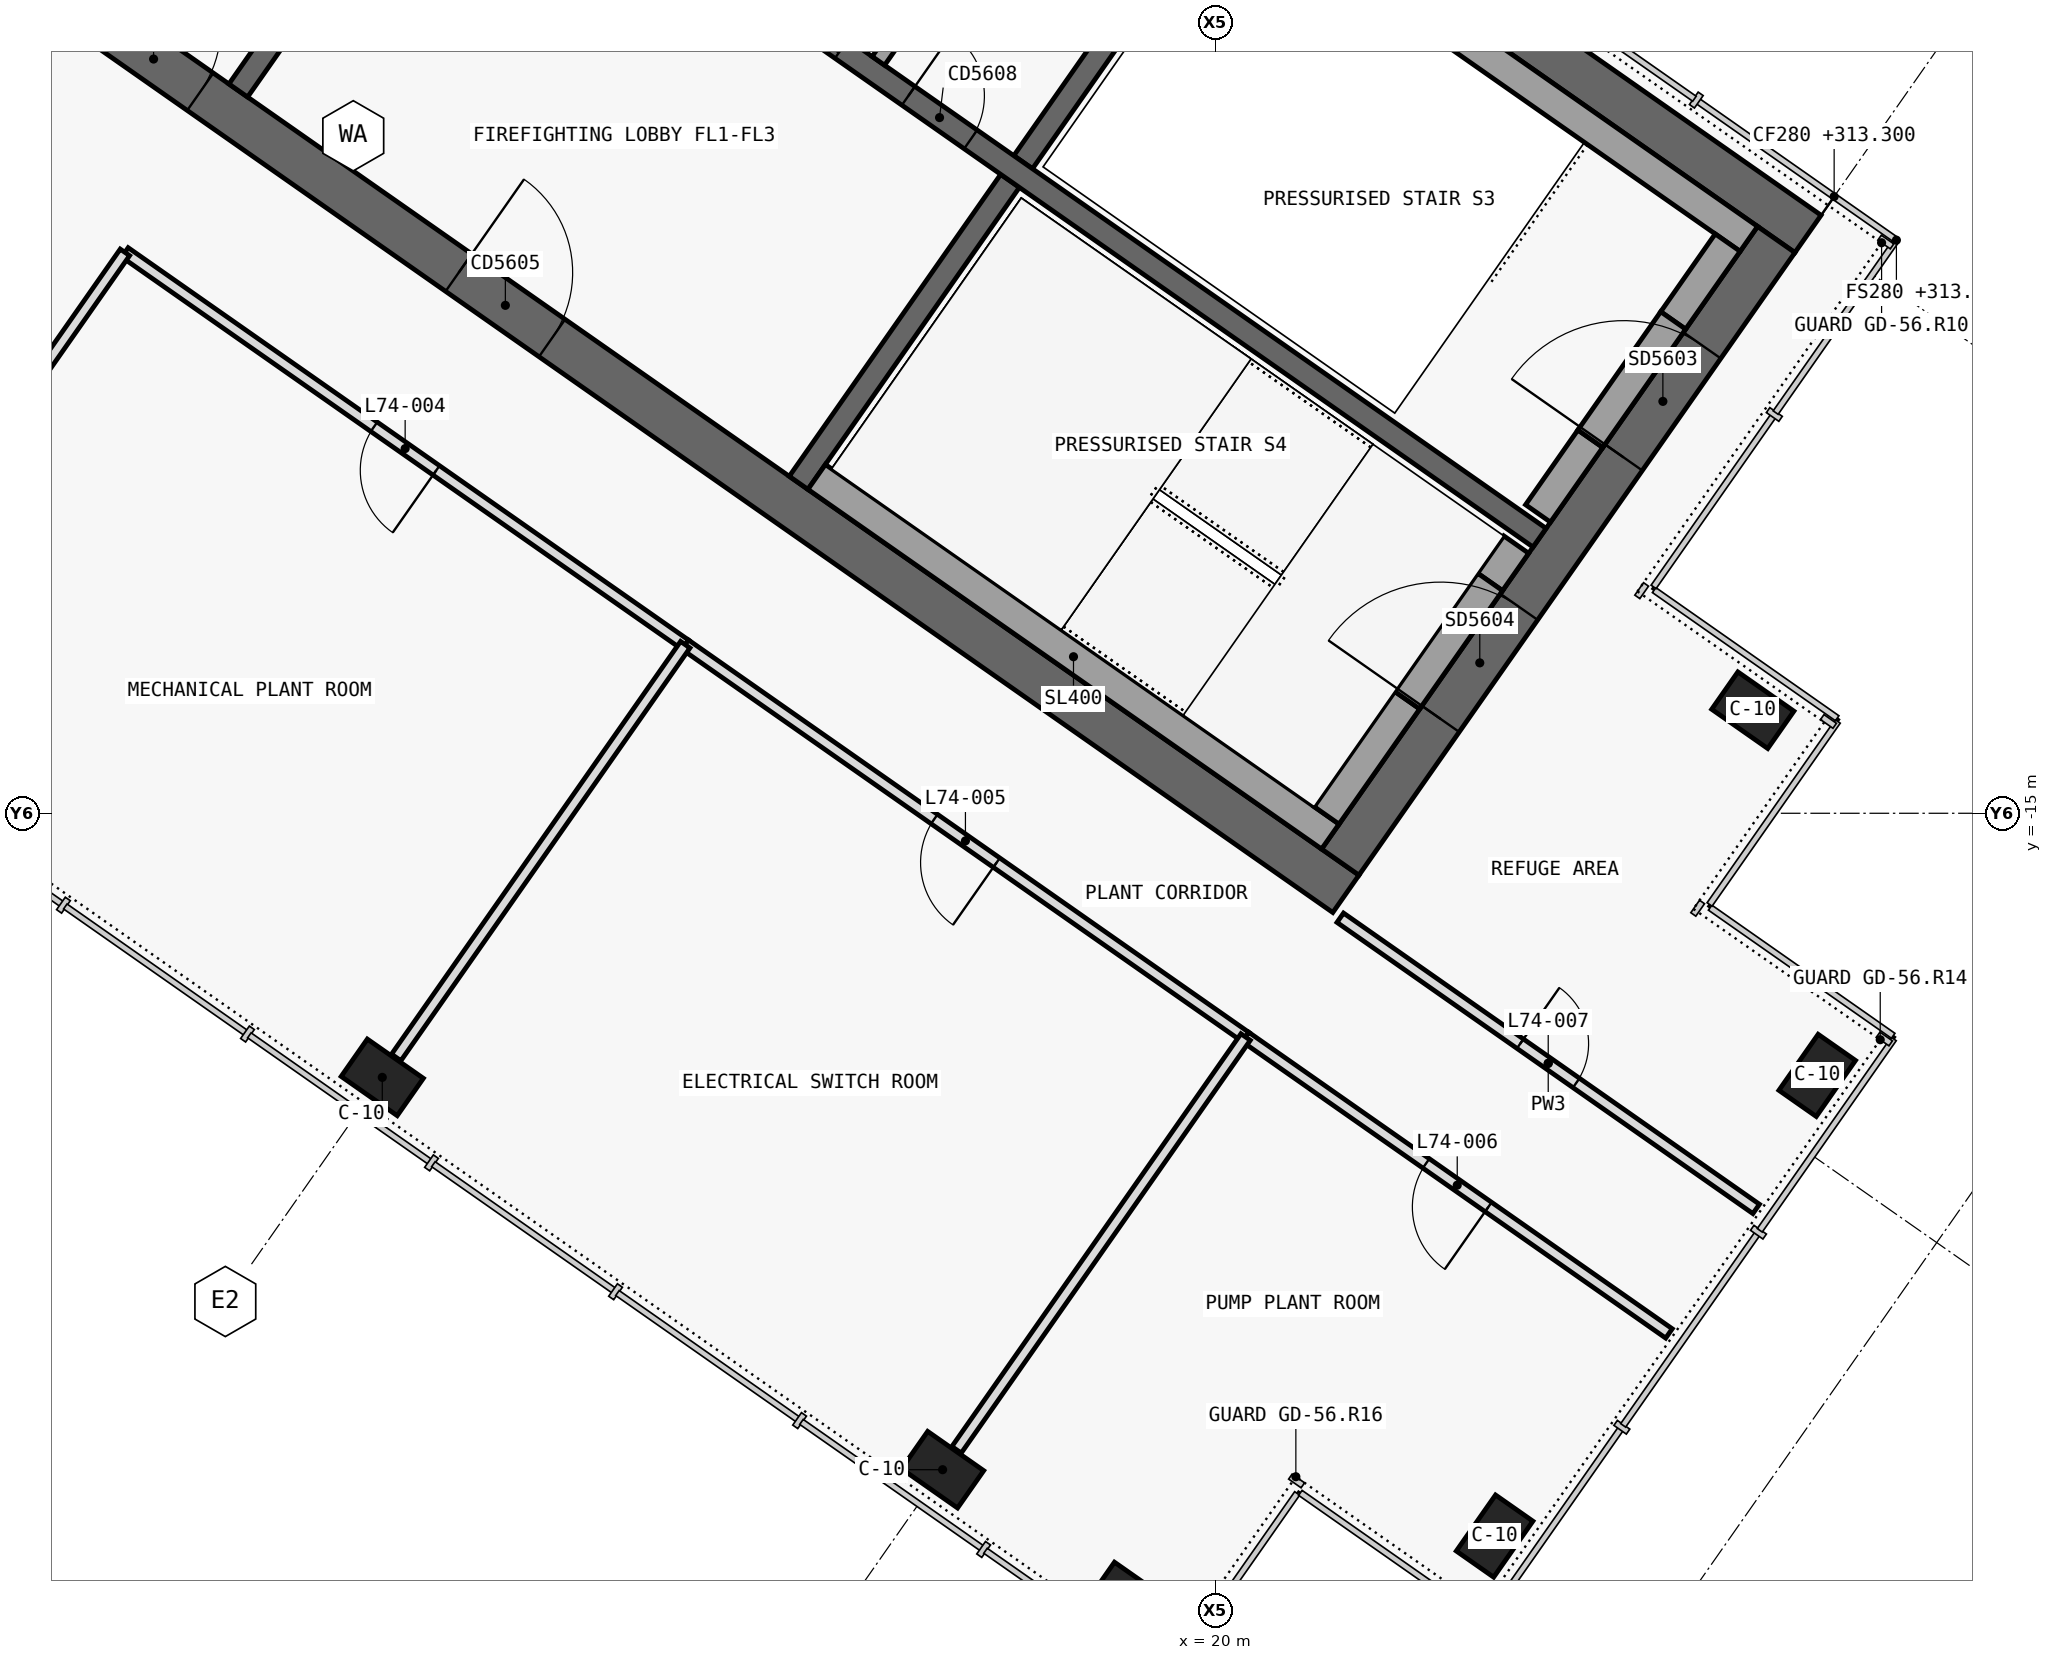
"""IFC4 building model, lengths in metres.
Left out: names, types, materials, properties, quantities, classifications, styles, units other than length and angle.
Written with IfcOpenShell. Run it as: python <this file> out.ifc"""

import sys

from ifc_helpers import new_model, si_unit, direction, frame, frame_2d, origin, origin_2d, place, context, subcontext, project, spatial, polyline, rectangle, outline, extrude, element, fill, save


model = new_model("IFC4")
c1 = context("Model", 3, precision=1e-05, world=origin(), true_north=direction((0.0, 1.0)))
c2 = subcontext(c1, "Body", "Model", "MODEL_VIEW")
j1 = project(units=[si_unit("LENGTHUNIT", "METRE"), si_unit("PLANEANGLEUNIT", "RADIAN")], contexts=[c1])
p1 = place(None, origin())
s1 = spatial("IfcSite", under=j1, at=p1, CompositionType="ELEMENT")
p2 = place(p1, origin())
s2 = spatial("IfcBuilding", under=s1, at=p2, CompositionType="ELEMENT")
p3 = place(p2, frame((0.0, 0.0, 313.3)))
s3 = spatial("IfcBuildingStorey", under=s2, at=p3, CompositionType="ELEMENT", Elevation=313.3)
p4 = place(p3, frame((0.028, 12.066, 0.0), z_axis=(0.0, 0.0, 1.0), x_axis=(0.819151382952, -0.573577380837, 0.0)))
e1 = element("IfcWall", 1, at=p4, inside=s3, PredefinedType="SHEAR", context=c2, shape_type="SweptSolid", body=[
    extrude(outline(polyline([(33.898, 0.3), (0.0, 0.3), (0.42, -0.3), (33.898, -0.3), (33.898, 0.3)])), origin(), (0.0, 0.0, 1.0), 5.5),
])
p5 = place(p3, frame((0.028, -0.874, 0.0), z_axis=(0.0, 0.0, 1.0), x_axis=(0.819150035022, -0.573579305871, 0.0)))
e2 = element("IfcWall", 2, at=p5, inside=s3, PredefinedType="SHEAR", context=c2, shape_type="SweptSolid", body=[
    extrude(outline(polyline([(26.476, 0.3), (0.0, 0.3), (0.42, -0.3), (26.476, -0.3), (26.476, 0.3)])), origin(), (0.0, 0.0, 1.0), 5.5),
])
p6 = place(p5, frame((6.576, 0.0, 0.0)))
e3 = element("IfcOpeningElement", 3, at=p6, cuts=e2, PredefinedType="OPENING", context=c2, shape_type="SweptSolid", body=[
    extrude(rectangle(XDim=1.5, YDim=2.1, at=frame_2d((0.75, 1.05))), frame((0.0, 0.31, 0.0), z_axis=(0.0, -1.0, 0.0), x_axis=(1.0, 0.0, 0.0)), (0.0, 0.0, 1.0), 0.62),
])
p7 = place(p5, frame((12.226, 0.0, 0.0)))
e4 = element("IfcOpeningElement", 4, at=p7, cuts=e2, PredefinedType="OPENING", context=c2, shape_type="SweptSolid", body=[
    extrude(rectangle(XDim=1.5, YDim=2.1, at=frame_2d((0.75, 1.05))), frame((0.0, 0.31, 0.0), z_axis=(0.0, -1.0, 0.0), x_axis=(1.0, 0.0, 0.0)), (0.0, 0.0, 1.0), 0.62),
])
p8 = place(p3, frame((21.642, -15.642, 0.0), z_axis=(0.0, 0.0, 1.0), x_axis=(0.573586866468, 0.819144740944, 0.0)))
e5 = element("IfcWall", 5, at=p8, inside=s3, PredefinedType="SHEAR", context=c2, shape_type="SweptSolid", body=[
    extrude(outline(polyline([(10.0, 0.3), (0.0, 0.3), (0.0, -0.3), (10.0, -0.3), (10.0, 0.3)])), origin(), (0.0, 0.0, 1.0), 5.5),
])
p9 = place(p8, frame((6.5, 0.0, 0.0)))
e6 = element("IfcOpeningElement", 6, at=p9, cuts=e5, PredefinedType="OPENING", context=c2, shape_type="SweptSolid", body=[
    extrude(rectangle(XDim=1.8, YDim=2.1, at=frame_2d((0.9, 1.05))), frame((0.0, 0.31, 0.0), z_axis=(0.0, -1.0, 0.0), x_axis=(1.0, 0.0, 0.0)), (0.0, 0.0, 1.0), 0.62),
])
p10 = place(p8, frame((2.3, 0.0, 0.0)))
e7 = element("IfcOpeningElement", 7, at=p10, cuts=e5, PredefinedType="OPENING", context=c2, shape_type="SweptSolid", body=[
    extrude(rectangle(XDim=1.8, YDim=2.1, at=frame_2d((0.9, 1.05))), frame((0.0, 0.31, 0.0), z_axis=(0.0, -1.0, 0.0), x_axis=(1.0, 0.0, 0.0)), (0.0, 0.0, 1.0), 0.62),
])
p11 = place(p3, frame((7.143, -5.49, 0.0), z_axis=(0.0, 0.0, 1.0), x_axis=(0.573617744349, 0.819123118565, 0.0)))
e8 = element("IfcWall", 8, at=p11, inside=s3, PredefinedType="SHEAR", context=c2, shape_type="SweptSolid", body=[
    extrude(outline(polyline([(0.0, 0.15), (0.0, -0.15), (4.85, -0.15), (4.85, 0.15), (0.0, 0.15)])), origin(), (0.0, 0.0, 1.0), 5.5),
])
p12 = place(p3, frame((14.515, -10.652, 0.0), z_axis=(0.0, 0.0, 1.0), x_axis=(0.573560315113, 0.819163332265, 0.0)))
e9 = element("IfcWall", 9, at=p12, inside=s3, PredefinedType="SHEAR", context=c2, shape_type="SweptSolid", body=[
    extrude(outline(polyline([(0.0, 0.15), (0.0, -0.15), (4.85, -0.15), (4.85, 0.15), (0.0, 0.15)])), origin(), (0.0, 0.0, 1.0), 5.5),
])
p13 = place(p3, frame((17.469, -6.433, 0.0), z_axis=(0.0, 0.0, 1.0), x_axis=(0.573594092424, 0.81913968109, 0.0)))
e10 = element("IfcWall", 10, at=p13, inside=s3, PredefinedType="SHEAR", context=c2, shape_type="SweptSolid", body=[
    extrude(outline(polyline([(4.85, -0.15), (4.85, 0.15), (0.0, 0.15), (0.0, -0.15), (4.85, -0.15)])), origin(), (0.0, 0.0, 1.0), 5.5),
])
p14 = place(p3, frame((2.638, 3.768, 0.0), z_axis=(0.0, 0.0, 1.0), x_axis=(0.819155014212, -0.573572194837, 0.0)))
e11 = element("IfcWall", 11, at=p14, inside=s3, PredefinedType="SHEAR", context=c2, shape_type="SweptSolid", body=[
    extrude(outline(polyline([(0.0, 0.15), (0.0, -0.15), (26.4, -0.15), (26.4, 0.15), (0.0, 0.15)])), origin(), (0.0, 0.0, 1.0), 5.5),
])
p15 = place(p14, frame((9.637, 0.0, 0.0)))
e12 = element("IfcOpeningElement", 12, at=p15, cuts=e11, PredefinedType="OPENING", context=c2, shape_type="SweptSolid", body=[
    extrude(rectangle(XDim=1.2, YDim=2.1, at=frame_2d((0.6, 1.05))), frame((0.0, 0.16, 0.0), z_axis=(0.0, -1.0, 0.0), x_axis=(1.0, 0.0, 0.0)), (0.0, 0.0, 1.0), 0.32),
])
p16 = place(p14, frame((11.812, 0.0, 0.0)))
e13 = element("IfcOpeningElement", 13, at=p16, cuts=e11, PredefinedType="OPENING", context=c2, shape_type="SweptSolid", body=[
    extrude(rectangle(XDim=1.2, YDim=2.1, at=frame_2d((0.6, 1.05))), frame((0.0, 0.16, 0.0), z_axis=(0.0, -1.0, 0.0), x_axis=(1.0, 0.0, 0.0)), (0.0, 0.0, 1.0), 0.32),
])
p17 = place(p14, frame((13.988, 0.0, 0.0)))
e14 = element("IfcOpeningElement", 14, at=p17, cuts=e11, PredefinedType="OPENING", context=c2, shape_type="SweptSolid", body=[
    extrude(rectangle(XDim=1.2, YDim=2.1, at=frame_2d((0.6, 1.05))), frame((0.0, 0.16, 0.0), z_axis=(0.0, -1.0, 0.0), x_axis=(1.0, 0.0, 0.0)), (0.0, 0.0, 1.0), 0.32),
])
p18 = place(p14, frame((16.262, 0.0, 0.0)))
e15 = element("IfcOpeningElement", 15, at=p18, cuts=e11, PredefinedType="OPENING", context=c2, shape_type="SweptSolid", body=[
    extrude(rectangle(XDim=1.0, YDim=2.1, at=frame_2d((0.5, 1.05))), frame((0.0, 0.16, 0.0), z_axis=(0.0, -1.0, 0.0), x_axis=(1.0, 0.0, 0.0)), (0.0, 0.0, 1.0), 0.32),
])
for number, where, z_axis, x_axis in (
    (16, (9.038, -18.475, 0.0), (0.0, 0.0, 1.0), (0.819, -0.574, 0.0)),
    (17, (16.41, -23.637, 0.0), (0.0, 0.0, 1.0), (0.819, -0.574, 0.0)),
    (18, (18.867, -25.358, 0.0), (0.0, 0.0, 1.0), (0.819, -0.574, 0.0)),
    (19, (27.07, -13.644, 0.0), (0.0, 0.0, 1.0), (0.819, -0.574, 0.0)),
    (20, (23.672, -24.51, 0.0), (0.0, 0.0, 1.0), (0.574, 0.819, 0.0)),
    (21, (27.917, -18.449, 0.0), (0.0, 0.0, 1.0), (0.574, 0.819, 0.0)),
):
    element("IfcColumn", number, at=place(p3, frame(where, z_axis=z_axis, x_axis=x_axis)), inside=s3, PredefinedType="COLUMN", context=c2, shape_type="SweptSolid", body=[
        extrude(rectangle(XDim=0.9, YDim=0.6, at=origin_2d()), origin(), (0.0, 0.0, 1.0), 5.5),
    ])
p19 = place(p3, frame((15.565, -5.1, 0.0), z_axis=(0.0, 0.0, 1.0), x_axis=(0.573560315113, 0.819163332265, 0.0)))
e22 = element("IfcWall", 22, at=p19, inside=s3, PredefinedType="SOLIDWALL", context=c2, shape_type="SweptSolid", body=[
    extrude(rectangle(XDim=4.85, YDim=0.2, at=frame_2d((2.425, 0.0))), origin(), (0.0, 0.0, 1.0), 5.22),
])
p20 = place(p3, frame((20.259, -2.71, 0.0), z_axis=(0.0, 0.0, 1.0), x_axis=(0.81914849389, -0.573581506813, 0.0)))
e23 = element("IfcWall", 23, at=p20, inside=s3, PredefinedType="SOLIDWALL", context=c2, shape_type="SweptSolid", body=[
    extrude(rectangle(XDim=8.25, YDim=0.4, at=frame_2d((4.125, 0.0))), origin(), (0.0, 0.0, 1.0), 5.22),
])
p21 = place(p3, frame((24.244, -11.055, 0.0), z_axis=(0.0, 0.0, 1.0), x_axis=(0.573571582932, 0.819155442668, 0.0)))
e24 = element("IfcWall", 24, at=p21, inside=s3, PredefinedType="SOLIDWALL", context=c2, shape_type="SweptSolid", body=[
    extrude(rectangle(XDim=1.2, YDim=0.4, at=frame_2d((0.6, 0.0))), origin(), (0.0, 0.0, 1.0), 5.22),
])
p22 = place(p3, frame((26.022, -8.515, 0.0), z_axis=(0.0, 0.0, 1.0), x_axis=(0.573619628835, 0.819121798889, 0.0)))
e25 = element("IfcWall", 25, at=p22, inside=s3, PredefinedType="SOLIDWALL", context=c2, shape_type="SweptSolid", body=[
    extrude(rectangle(XDim=1.25, YDim=0.4, at=frame_2d((0.625, 0.0))), origin(), (0.0, 0.0, 1.0), 5.22),
])
p23 = place(p3, frame((24.932, -10.072, 2.15), z_axis=(0.0, 0.0, 1.0), x_axis=(0.573591692345, 0.819141361715, 0.0)))
e26 = element("IfcWall", 26, at=p23, inside=s3, PredefinedType="SOLIDWALL", context=c2, shape_type="SweptSolid", body=[
    extrude(rectangle(XDim=1.9, YDim=0.4, at=frame_2d((0.95, 0.0))), origin(), (0.0, 0.0, 1.0), 3.07),
])
p24 = place(p3, frame((14.753, -10.574, 0.0), z_axis=(0.0, 0.0, 1.0), x_axis=(0.819158229677, -0.573567602601, 0.0)))
e27 = element("IfcWall", 27, at=p24, inside=s3, PredefinedType="SOLIDWALL", context=c2, shape_type="SweptSolid", body=[
    extrude(rectangle(XDim=8.25, YDim=0.4, at=frame_2d((4.125, 0.0))), origin(), (0.0, 0.0, 1.0), 5.22),
])
p25 = place(p3, frame((21.462, -15.028, 0.0), z_axis=(0.0, 0.0, 1.0), x_axis=(0.573559770908, 0.819163713305, 0.0)))
e28 = element("IfcWall", 28, at=p25, inside=s3, PredefinedType="SOLIDWALL", context=c2, shape_type="SweptSolid", body=[
    extrude(rectangle(XDim=1.85, YDim=0.4, at=frame_2d((0.925, 0.0))), origin(), (0.0, 0.0, 1.0), 5.22),
])
p26 = place(p3, frame((23.613, -11.956, 0.0), z_axis=(0.0, 0.0, 1.0), x_axis=(0.573435029941, 0.819251039936, 0.0)))
e29 = element("IfcWall", 29, at=p26, inside=s3, PredefinedType="SOLIDWALL", context=c2, shape_type="SweptSolid", body=[
    extrude(rectangle(XDim=0.6, YDim=0.4, at=frame_2d((0.3, 0.0))), origin(), (0.0, 0.0, 1.0), 5.22),
])
p27 = place(p3, frame((22.523, -13.512, 2.15), z_axis=(0.0, 0.0, 1.0), x_axis=(0.573591692345, 0.819141361715, 0.0)))
e30 = element("IfcWall", 30, at=p27, inside=s3, PredefinedType="SOLIDWALL", context=c2, shape_type="SweptSolid", body=[
    extrude(rectangle(XDim=1.9, YDim=0.4, at=frame_2d((0.95, 0.0))), origin(), (0.0, 0.0, 1.0), 3.07),
])
p28 = place(p3, frame((21.642, -16.375, 0.0), z_axis=(0.0, 0.0, 1.0), x_axis=(0.819147777977, -0.573582529227, 0.0)))
e31 = element("IfcWall", 31, at=p28, inside=s3, PredefinedType="PARTITIONING", context=c2, shape_type="SweptSolid", body=[
    extrude(rectangle(XDim=6.68, YDim=0.15, at=frame_2d((3.34, 0.0))), origin(), (0.0, 0.0, 1.0), 5.2),
])
p29 = place(p28, frame((2.89, 0.0, 0.0)))
e32 = element("IfcOpeningElement", 32, at=p29, cuts=e31, PredefinedType="OPENING", context=c2, shape_type="SweptSolid", body=[
    extrude(rectangle(XDim=0.9, YDim=2.1, at=frame_2d((0.45, 1.05))), frame((0.0, 0.085, 0.0), z_axis=(0.0, -1.0, 0.0), x_axis=(1.0, 0.0, 0.0)), (0.0, 0.0, 1.0), 0.17),
])
p30 = place(p3, frame((13.026, -12.783, 0.0), z_axis=(0.0, 0.0, 1.0), x_axis=(-0.81915291695, 0.57357519006, 0.0)))
e33 = element("IfcWall", 33, at=p30, inside=s3, PredefinedType="PARTITIONING", context=c2, shape_type="SweptSolid", body=[
    extrude(rectangle(XDim=9.002, YDim=0.15, at=frame_2d((4.501, 0.0))), origin(), (0.0, 0.0, 1.0), 5.2),
])
p31 = place(p30, frame((4.001, 0.0, 0.0)))
e34 = element("IfcOpeningElement", 34, at=p31, cuts=e33, PredefinedType="OPENING", context=c2, shape_type="SweptSolid", body=[
    extrude(rectangle(XDim=1.0, YDim=2.1, at=frame_2d((0.5, 1.05))), frame((0.0, 0.085, 0.0), z_axis=(0.0, -1.0, 0.0), x_axis=(1.0, 0.0, 0.0)), (0.0, 0.0, 1.0), 0.17),
])
p32 = place(p3, frame((20.398, -17.945, 0.0), z_axis=(0.0, 0.0, 1.0), x_axis=(-0.819142740634, 0.573589723117, 0.0)))
e35 = element("IfcWall", 35, at=p32, inside=s3, PredefinedType="PARTITIONING", context=c2, shape_type="SweptSolid", body=[
    extrude(rectangle(XDim=9.004, YDim=0.15, at=frame_2d((4.502, 0.0))), origin(), (0.0, 0.0, 1.0), 5.2),
])
p33 = place(p32, frame((4.002, 0.0, 0.0)))
e36 = element("IfcOpeningElement", 36, at=p33, cuts=e35, PredefinedType="OPENING", context=c2, shape_type="SweptSolid", body=[
    extrude(rectangle(XDim=1.0, YDim=2.1, at=frame_2d((0.5, 1.05))), frame((0.0, 0.085, 0.0), z_axis=(0.0, -1.0, 0.0), x_axis=(1.0, 0.0, 0.0)), (0.0, 0.0, 1.0), 0.17),
])
p34 = place(p3, frame((25.967, -21.844, 0.0), z_axis=(0.0, 0.0, 1.0), x_axis=(-0.819154345195, 0.573573150303, 0.0)))
e37 = element("IfcWall", 37, at=p34, inside=s3, PredefinedType="PARTITIONING", context=c2, shape_type="SweptSolid", body=[
    extrude(rectangle(XDim=6.802, YDim=0.15, at=frame_2d((3.401, 0.0))), origin(), (0.0, 0.0, 1.0), 5.2),
])
p35 = place(p34, frame((2.901, 0.0, 0.0)))
e38 = element("IfcOpeningElement", 38, at=p35, cuts=e37, PredefinedType="OPENING", context=c2, shape_type="SweptSolid", body=[
    extrude(rectangle(XDim=1.0, YDim=2.1, at=frame_2d((0.5, 1.05))), frame((0.0, 0.085, 0.0), z_axis=(0.0, -1.0, 0.0), x_axis=(1.0, 0.0, 0.0)), (0.0, 0.0, 1.0), 0.17),
])
p36 = place(p3, frame((13.024, -12.782, 0.0), z_axis=(0.0, 0.0, 1.0), x_axis=(-0.573556251799, -0.819166177294, 0.0)))
e39 = element("IfcWall", 39, at=p36, inside=s3, PredefinedType="PARTITIONING", context=c2, shape_type="SweptSolid", body=[
    extrude(rectangle(XDim=6.63, YDim=0.15, at=frame_2d((3.315, 0.0))), origin(), (0.0, 0.0, 1.0), 5.2),
])
p37 = place(p3, frame((1.849, -13.051, 0.0), z_axis=(0.0, 0.0, 1.0), x_axis=(0.57357355307, 0.819154063177, 0.0)))
e40 = element("IfcWall", 40, at=p37, inside=s3, PredefinedType="PARTITIONING", context=c2, shape_type="SweptSolid", body=[
    extrude(rectangle(XDim=6.63, YDim=0.15, at=frame_2d((3.315, 0.0))), origin(), (0.0, 0.0, 1.0), 5.2),
])
p38 = place(p3, frame((20.396, -17.944, 0.0), z_axis=(0.0, 0.0, 1.0), x_axis=(-0.57359826181, -0.819136761505, 0.0)))
e41 = element("IfcWall", 41, at=p38, inside=s3, PredefinedType="PARTITIONING", context=c2, shape_type="SweptSolid", body=[
    extrude(rectangle(XDim=6.63, YDim=0.15, at=frame_2d((3.315, 0.0))), origin(), (0.0, 0.0, 1.0), 5.2),
])
p39 = place(p18, origin())
e42 = element("IfcDoor", 42, at=p39, inside=s3, OperationType="SINGLE_SWING_RIGHT", PredefinedType="DOOR", context=c2, shape_type="SweptSolid", body=[
    extrude(rectangle(XDim=1.0, YDim=2.1, at=frame_2d((0.5, 1.05))), frame((0.0, 0.025, 0.0), z_axis=(0.0, -1.0, 0.0), x_axis=(1.0, 0.0, 0.0)), (0.0, 0.0, 1.0), 0.05),
])
fill(e15, e42)
p40 = place(p6, origin())
e43 = element("IfcDoor", 43, at=p40, inside=s3, OperationType="SINGLE_SWING_RIGHT", PredefinedType="DOOR", context=c2, shape_type="SweptSolid", body=[
    extrude(rectangle(XDim=1.5, YDim=2.1, at=frame_2d((0.75, 1.05))), frame((0.0, 0.025, 0.0), z_axis=(0.0, -1.0, 0.0), x_axis=(1.0, 0.0, 0.0)), (0.0, 0.0, 1.0), 0.05),
])
fill(e3, e43)
p41 = place(p7, origin())
e44 = element("IfcDoor", 44, at=p41, inside=s3, OperationType="DOUBLE_DOOR_SINGLE_SWING", PredefinedType="DOOR", context=c2, shape_type="SweptSolid", body=[
    extrude(rectangle(XDim=1.5, YDim=2.1, at=frame_2d((0.75, 1.05))), frame((0.0, 0.025, 0.0), z_axis=(0.0, -1.0, 0.0), x_axis=(1.0, 0.0, 0.0)), (0.0, 0.0, 1.0), 0.05),
])
fill(e4, e44)
p42 = place(p9, origin())
e45 = element("IfcDoor", 45, at=p42, inside=s3, OperationType="DOUBLE_DOOR_SINGLE_SWING", PredefinedType="DOOR", context=c2, shape_type="SweptSolid", body=[
    extrude(rectangle(XDim=1.8, YDim=2.1, at=frame_2d((0.9, 1.05))), frame((0.0, 0.025, 0.0), z_axis=(0.0, -1.0, 0.0), x_axis=(1.0, 0.0, 0.0)), (0.0, 0.0, 1.0), 0.05),
])
fill(e6, e45)
p43 = place(p10, origin())
e46 = element("IfcDoor", 46, at=p43, inside=s3, OperationType="DOUBLE_DOOR_SINGLE_SWING", PredefinedType="DOOR", context=c2, shape_type="SweptSolid", body=[
    extrude(rectangle(XDim=1.8, YDim=2.1, at=frame_2d((0.9, 1.05))), frame((0.0, 0.025, 0.0), z_axis=(0.0, -1.0, 0.0), x_axis=(1.0, 0.0, 0.0)), (0.0, 0.0, 1.0), 0.05),
])
fill(e7, e46)
p44 = place(p31, origin())
e47 = element("IfcDoor", 47, at=p44, inside=s3, OperationType="SINGLE_SWING_LEFT", PredefinedType="DOOR", context=c2, shape_type="SweptSolid", body=[
    extrude(rectangle(XDim=1.0, YDim=2.1, at=frame_2d((0.5, 1.05))), frame((0.0, 0.025, 0.0), z_axis=(0.0, -1.0, 0.0), x_axis=(1.0, 0.0, 0.0)), (0.0, 0.0, 1.0), 0.05),
])
fill(e34, e47)
p45 = place(p33, origin())
e48 = element("IfcDoor", 48, at=p45, inside=s3, OperationType="SINGLE_SWING_RIGHT", PredefinedType="DOOR", context=c2, shape_type="SweptSolid", body=[
    extrude(rectangle(XDim=1.0, YDim=2.1, at=frame_2d((0.5, 1.05))), frame((0.0, 0.025, 0.0), z_axis=(0.0, -1.0, 0.0), x_axis=(1.0, 0.0, 0.0)), (0.0, 0.0, 1.0), 0.05),
])
fill(e36, e48)
p46 = place(p35, origin())
e49 = element("IfcDoor", 49, at=p46, inside=s3, OperationType="SINGLE_SWING_RIGHT", PredefinedType="DOOR", context=c2, shape_type="SweptSolid", body=[
    extrude(rectangle(XDim=1.0, YDim=2.1, at=frame_2d((0.5, 1.05))), frame((0.0, 0.025, 0.0), z_axis=(0.0, -1.0, 0.0), x_axis=(1.0, 0.0, 0.0)), (0.0, 0.0, 1.0), 0.05),
])
fill(e38, e49)
p47 = place(p29, origin())
e50 = element("IfcDoor", 50, at=p47, inside=s3, OperationType="SINGLE_SWING_RIGHT", PredefinedType="DOOR", context=c2, shape_type="SweptSolid", body=[
    extrude(rectangle(XDim=0.9, YDim=2.1, at=frame_2d((0.45, 1.05))), frame((0.0, 0.025, 0.0), z_axis=(0.0, -1.0, 0.0), x_axis=(1.0, 0.0, 0.0)), (0.0, 0.0, 1.0), 0.05),
])
fill(e32, e50)
save(model, sys.argv[1])
